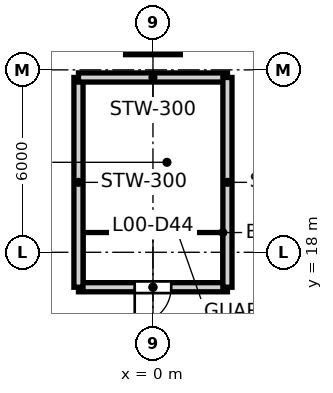
"""IFC4 building model, lengths in metres.
Left out: names, types, materials, properties, quantities, classifications, styles, units other than length and angle.
Written with IfcOpenShell. Run it as: python <this file> out.ifc"""

import sys

from ifc_helpers import new_model, si_unit, direction, frame, frame_2d, origin, origin_2d, place, context, subcontext, project, spatial, rectangle, hollow_rectangle, extrude, element, fill, save


model = new_model("IFC4")
c1 = context("Model", 3, precision=1e-05, world=origin(), true_north=direction((0.0, 1.0)))
c2 = subcontext(c1, "Body", "Model", "MODEL_VIEW")
j1 = project(units=[si_unit("LENGTHUNIT", "METRE"), si_unit("PLANEANGLEUNIT", "RADIAN")], contexts=[c1])
p1 = place(None, origin())
s1 = spatial("IfcSite", under=j1, at=p1, CompositionType="ELEMENT")
p2 = place(p1, origin())
s2 = spatial("IfcBuilding", under=s1, at=p2, CompositionType="ELEMENT")
p3 = place(p2, origin())
s3 = spatial("IfcBuildingStorey", under=s2, at=p3, CompositionType="ELEMENT", Elevation=0.0)
p4 = place(p3, frame((0.0, 25.4, 0.0), z_axis=(0.0, 0.0, 1.0), x_axis=(0.0, 1.0, 0.0)))
e1 = element("IfcColumn", 1, at=p4, inside=s3, PredefinedType="COLUMN", context=c2, shape_type="SweptSolid", body=[
    extrude(hollow_rectangle(XDim=1.8, YDim=1.8, WallThickness=0.08, at=origin_2d()), origin(), (0.0, 0.0, 1.0), 8.0),
])
p5 = place(p3, frame((2.45, 16.85, 0.0), z_axis=(0.0, 0.0, 1.0), x_axis=(-1.0, 0.0, 0.0)))
e2 = element("IfcWall", 2, at=p5, inside=s3, PredefinedType="SOLIDWALL", context=c2, shape_type="SweptSolid", body=[
    extrude(rectangle(XDim=4.9, YDim=0.3, at=frame_2d((2.45, 0.0))), origin(), (0.0, 0.0, 1.0), 7.8),
])
p6 = place(p5, frame((1.85, 0.0, 0.0)))
e3 = element("IfcOpeningElement", 3, at=p6, cuts=e2, PredefinedType="OPENING", context=c2, shape_type="SweptSolid", body=[
    extrude(rectangle(XDim=1.2, YDim=2.1, at=frame_2d((0.6, 1.05))), frame((0.0, 0.15, 0.0), z_axis=(0.0, -1.0, 0.0), x_axis=(1.0, 0.0, 0.0)), (0.0, 0.0, 1.0), 0.3),
])
p7 = place(p3, frame((-2.45, 16.85, 0.0), z_axis=(0.0, 0.0, 1.0), x_axis=(0.0, 1.0, 0.0)))
e4 = element("IfcWall", 4, at=p7, inside=s3, PredefinedType="SOLIDWALL", context=c2, shape_type="SweptSolid", body=[
    extrude(rectangle(XDim=6.9, YDim=0.3, at=frame_2d((3.45, 0.0))), origin(), (0.0, 0.0, 1.0), 7.8),
])
p8 = place(p3, frame((-2.45, 23.75, 0.0), z_axis=(0.0, 0.0, 1.0), x_axis=(1.0, 0.0, 0.0)))
e5 = element("IfcWall", 5, at=p8, inside=s3, PredefinedType="SOLIDWALL", context=c2, shape_type="SweptSolid", body=[
    extrude(rectangle(XDim=4.9, YDim=0.3, at=frame_2d((2.45, 0.0))), origin(), (0.0, 0.0, 1.0), 7.8),
])
p9 = place(p3, frame((2.45, 23.75, 0.0), z_axis=(0.0, 0.0, 1.0), x_axis=(0.0, -1.0, 0.0)))
e6 = element("IfcWall", 6, at=p9, inside=s3, PredefinedType="SOLIDWALL", context=c2, shape_type="SweptSolid", body=[
    extrude(rectangle(XDim=6.9, YDim=0.3, at=frame_2d((3.45, 0.0))), origin(), (0.0, 0.0, 1.0), 7.8),
])
p10 = place(p6, origin())
e7 = element("IfcDoor", 7, at=p10, inside=s3, OperationType="SINGLE_SWING_RIGHT", PredefinedType="DOOR", context=c2, shape_type="SweptSolid", body=[
    extrude(rectangle(XDim=1.2, YDim=2.1, at=frame_2d((0.6, 1.05))), frame((0.0, 0.025, 0.0), z_axis=(0.0, -1.0, 0.0), x_axis=(1.0, 0.0, 0.0)), (0.0, 0.0, 1.0), 0.05),
])
fill(e3, e7)
save(model, sys.argv[1])
